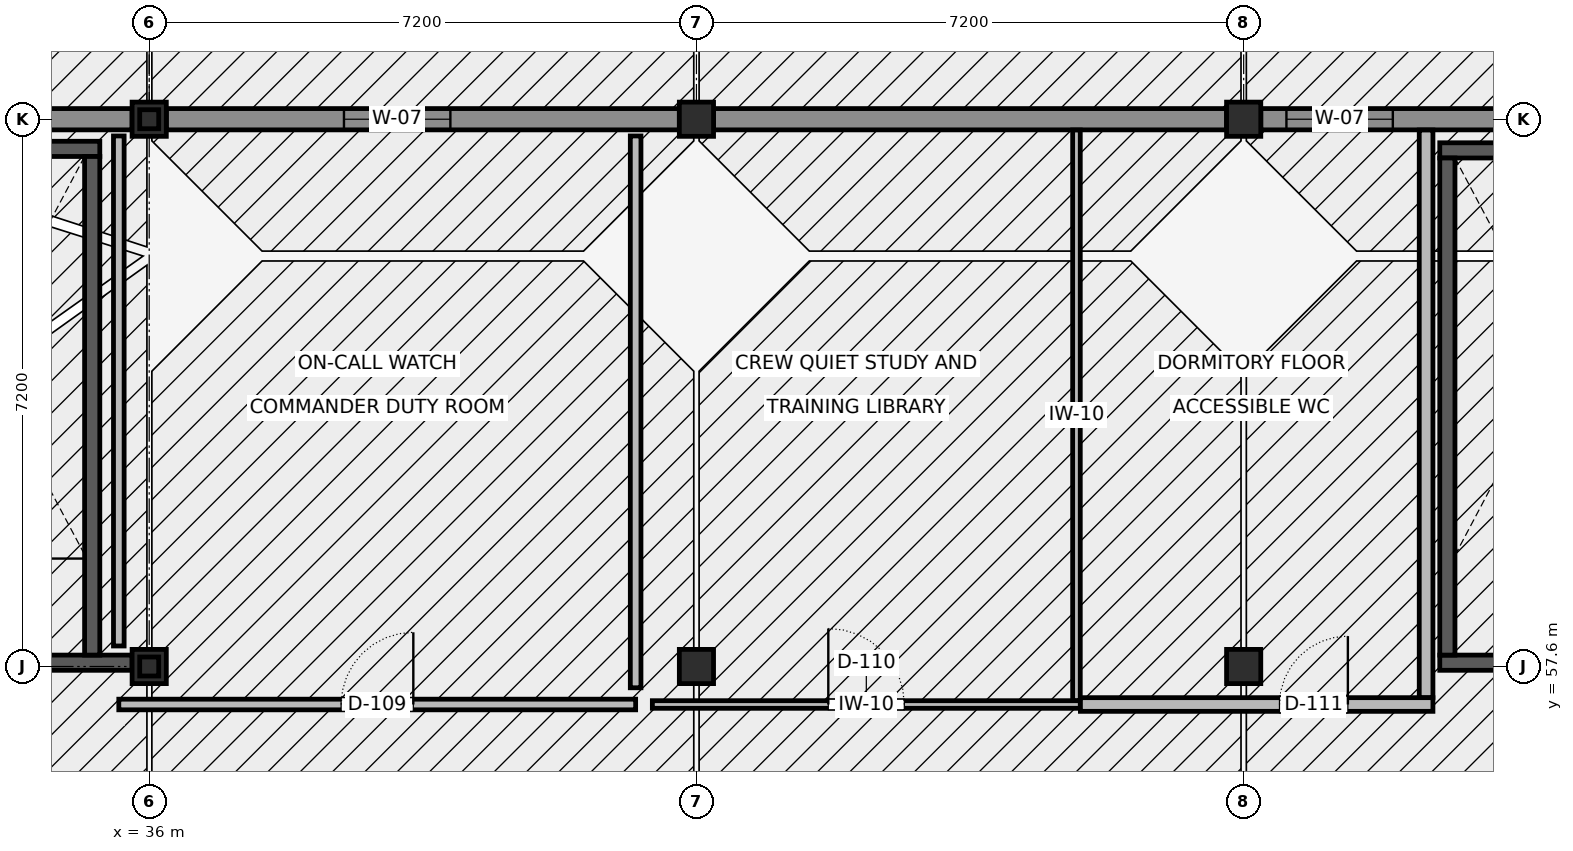
"""IFC4 building model, lengths in metres.
Left out: names, types, materials, properties, quantities, classifications, styles, units other than length and angle.
Written with IfcOpenShell. Run it as: python <this file> out.ifc"""

import sys

from ifc_helpers import new_model, si_unit, direction, frame, frame_2d, origin, origin_2d, place, context, subcontext, project, spatial, rectangle, hollow_rectangle, extrude, element, fill, save


model = new_model("IFC4")
c1 = context("Model", 3, precision=1e-05, world=origin(), true_north=direction((0.0, 1.0)))
c2 = subcontext(c1, "Body", "Model", "MODEL_VIEW")
j1 = project(units=[si_unit("LENGTHUNIT", "METRE"), si_unit("PLANEANGLEUNIT", "RADIAN")], contexts=[c1])
p1 = place(None, origin())
s1 = spatial("IfcSite", under=j1, at=p1, CompositionType="ELEMENT")
p2 = place(p1, origin())
s2 = spatial("IfcBuilding", under=s1, at=p2, CompositionType="ELEMENT")
p3 = place(p2, frame((0.0, 0.0, 9.6)))
s3 = spatial("IfcBuildingStorey", under=s2, at=p3, CompositionType="ELEMENT", Elevation=9.6)
for number, where, z_axis, x_axis in (
    (1, (36.0, 57.6, 0.0), (0.0, 0.0, 1.0), (1.0, 0.0, 0.0)),
    (2, (36.0, 64.8, 0.0), (0.0, 0.0, 1.0), (1.0, 0.0, 0.0)),
    (3, (43.2, 57.6, 0.0), (0.0, 0.0, 1.0), (1.0, 0.0, 0.0)),
    (4, (43.2, 64.8, 0.0), (0.0, 0.0, 1.0), (1.0, 0.0, 0.0)),
    (5, (50.4, 57.6, 0.0), (0.0, 0.0, 1.0), (1.0, 0.0, 0.0)),
    (6, (50.4, 64.8, 0.0), (0.0, 0.0, 1.0), (1.0, 0.0, 0.0)),
):
    element("IfcColumn", number, at=place(p3, frame(where, z_axis=z_axis, x_axis=x_axis)), inside=s3, PredefinedType="COLUMN", context=c2, shape_type="SweptSolid", body=[
        extrude(rectangle(XDim=0.45, YDim=0.45, at=origin_2d()), origin(), (0.0, 0.0, 1.0), 3.9),
    ])
p4 = place(p3, frame((32.16, 57.65, 0.0), z_axis=(0.0, 0.0, 1.0), x_axis=(1.0, 0.0, 0.0)))
e7 = element("IfcWall", 7, at=p4, inside=s3, PredefinedType="SHEAR", context=c2, shape_type="SweptSolid", body=[
    extrude(rectangle(XDim=3.615, YDim=0.2, at=frame_2d((1.808, 0.0))), origin(), (0.0, 0.0, 1.0), 3.65),
])
p5 = place(p4, frame((1.258, 0.0, 0.0)))
e8 = element("IfcOpeningElement", 8, at=p5, cuts=e7, PredefinedType="OPENING", context=c2, shape_type="SweptSolid", body=[
    extrude(rectangle(XDim=1.1, YDim=2.15, at=frame_2d((0.55, 1.075))), frame((0.0, 0.112, 0.0), z_axis=(0.0, -1.0, 0.0), x_axis=(1.0, 0.0, 0.0)), (0.0, 0.0, 1.0), 0.224),
])
p6 = place(p3, frame((32.16, 64.41, 0.0), z_axis=(0.0, 0.0, 1.0), x_axis=(1.0, 0.0, 0.0)))
e9 = element("IfcWall", 9, at=p6, inside=s3, PredefinedType="SHEAR", context=c2, shape_type="SweptSolid", body=[
    extrude(rectangle(XDim=3.19, YDim=0.2, at=frame_2d((1.595, 0.0))), origin(), (0.0, 0.0, 1.0), 3.65),
])
p7 = place(p3, frame((35.25, 57.75, 0.0), z_axis=(0.0, 0.0, 1.0), x_axis=(0.0, 1.0, 0.0)))
e10 = element("IfcWall", 10, at=p7, inside=s3, PredefinedType="SHEAR", context=c2, shape_type="SweptSolid", body=[
    extrude(rectangle(XDim=6.56, YDim=0.2, at=frame_2d((3.28, 0.0))), origin(), (0.0, 0.0, 1.0), 3.65),
])
p8 = place(p3, frame((52.98, 57.65, 0.0), z_axis=(0.0, 0.0, 1.0), x_axis=(1.0, 0.0, 0.0)))
e11 = element("IfcWall", 11, at=p8, inside=s3, PredefinedType="SHEAR", context=c2, shape_type="SweptSolid", body=[
    extrude(rectangle(XDim=3.495, YDim=0.2, at=frame_2d((1.748, 0.0))), origin(), (0.0, 0.0, 1.0), 3.65),
])
p9 = place(p8, frame((1.198, 0.0, 0.0)))
e12 = element("IfcOpeningElement", 12, at=p9, cuts=e11, PredefinedType="OPENING", context=c2, shape_type="SweptSolid", body=[
    extrude(rectangle(XDim=1.1, YDim=2.15, at=frame_2d((0.55, 1.075))), frame((0.0, 0.112, 0.0), z_axis=(0.0, -1.0, 0.0), x_axis=(1.0, 0.0, 0.0)), (0.0, 0.0, 1.0), 0.224),
])
p10 = place(p3, frame((52.98, 64.39, 0.0), z_axis=(0.0, 0.0, 1.0), x_axis=(1.0, 0.0, 0.0)))
e13 = element("IfcWall", 13, at=p10, inside=s3, PredefinedType="SHEAR", context=c2, shape_type="SweptSolid", body=[
    extrude(rectangle(XDim=3.17, YDim=0.2, at=frame_2d((1.585, 0.0))), origin(), (0.0, 0.0, 1.0), 3.65),
])
p11 = place(p3, frame((53.08, 57.75, 0.0), z_axis=(0.0, 0.0, 1.0), x_axis=(0.0, 1.0, 0.0)))
e14 = element("IfcWall", 14, at=p11, inside=s3, PredefinedType="SHEAR", context=c2, shape_type="SweptSolid", body=[
    extrude(rectangle(XDim=6.54, YDim=0.2, at=frame_2d((3.27, 0.0))), origin(), (0.0, 0.0, 1.0), 3.65),
])
for number, where, z_axis, x_axis in (
    (15, (36.0, 57.6, 3.9), (0.0, 0.0, 1.0), (1.0, 0.0, 0.0)),
    (16, (36.0, 64.8, 3.9), (0.0, 0.0, 1.0), (1.0, 0.0, 0.0)),
):
    element("IfcColumn", number, at=place(p3, frame(where, z_axis=z_axis, x_axis=x_axis)), inside=s3, PredefinedType="COLUMN", context=c2, shape_type="SweptSolid", body=[
        extrude(hollow_rectangle(XDim=0.25, YDim=0.25, WallThickness=0.012, InnerFilletRadius=0.012, OuterFilletRadius=0.024, at=origin_2d()), origin(), (0.0, 0.0, 1.0), 4.18),
    ])
p12 = place(p3, frame((56.475, 64.8, 0.0), z_axis=(0.0, 0.0, 1.0), x_axis=(-1.0, 0.0, 0.0)))
e17 = element("IfcWall", 17, at=p12, inside=s3, PredefinedType="ELEMENTEDWALL", context=c2, shape_type="SweptSolid", body=[
    extrude(rectangle(XDim=5.85, YDim=0.28, at=frame_2d((2.925, 0.0))), origin(), (0.0, 0.0, 1.0), 3.475),
])
p13 = place(p12, frame((4.113, 0.0, 0.85)))
e18 = element("IfcOpeningElement", 18, at=p13, cuts=e17, PredefinedType="OPENING", context=c2, shape_type="SweptSolid", body=[
    extrude(rectangle(XDim=1.4, YDim=1.65, at=frame_2d((0.7, 0.825))), frame((0.0, 0.152, 0.0), z_axis=(0.0, -1.0, 0.0), x_axis=(1.0, 0.0, 0.0)), (0.0, 0.0, 1.0), 0.304),
])
p14 = place(p3, frame((50.175, 64.8, 0.0), z_axis=(0.0, 0.0, 1.0), x_axis=(-1.0, 0.0, 0.0)))
e19 = element("IfcWall", 19, at=p14, inside=s3, PredefinedType="ELEMENTEDWALL", context=c2, shape_type="SweptSolid", body=[
    extrude(rectangle(XDim=6.75, YDim=0.28, at=frame_2d((3.375, 0.0))), origin(), (0.0, 0.0, 1.0), 3.475),
])
p15 = place(p3, frame((42.975, 64.8, 0.0), z_axis=(0.0, 0.0, 1.0), x_axis=(-1.0, 0.0, 0.0)))
e20 = element("IfcWall", 20, at=p15, inside=s3, PredefinedType="ELEMENTEDWALL", context=c2, shape_type="SweptSolid", body=[
    extrude(rectangle(XDim=6.75, YDim=0.28, at=frame_2d((3.375, 0.0))), origin(), (0.0, 0.0, 1.0), 3.475),
])
p16 = place(p15, frame((3.012, 0.0, 0.85)))
e21 = element("IfcOpeningElement", 21, at=p16, cuts=e20, PredefinedType="OPENING", context=c2, shape_type="SweptSolid", body=[
    extrude(rectangle(XDim=1.4, YDim=1.65, at=frame_2d((0.7, 0.825))), frame((0.0, 0.152, 0.0), z_axis=(0.0, -1.0, 0.0), x_axis=(1.0, 0.0, 0.0)), (0.0, 0.0, 1.0), 0.304),
])
p17 = place(p3, frame((35.775, 64.8, 0.0), z_axis=(0.0, 0.0, 1.0), x_axis=(-1.0, 0.0, 0.0)))
e22 = element("IfcWall", 22, at=p17, inside=s3, PredefinedType="ELEMENTEDWALL", context=c2, shape_type="SweptSolid", body=[
    extrude(rectangle(XDim=6.75, YDim=0.28, at=frame_2d((3.375, 0.0))), origin(), (0.0, 0.0, 1.0), 3.475),
])
p18 = place(p3, frame((35.6, 57.1, 0.0), z_axis=(0.0, 0.0, 1.0), x_axis=(1.0, 0.0, 0.0)))
e23 = element("IfcWall", 23, at=p18, inside=s3, PredefinedType="PARTITIONING", context=c2, shape_type="SweptSolid", body=[
    extrude(rectangle(XDim=6.8, YDim=0.14, at=frame_2d((3.4, 0.0))), origin(), (0.0, 0.0, 1.0), 3.471),
])
p19 = place(p18, frame((2.925, 0.0, 0.0)))
e24 = element("IfcOpeningElement", 24, at=p19, cuts=e23, PredefinedType="OPENING", context=c2, shape_type="SweptSolid", body=[
    extrude(rectangle(XDim=0.95, YDim=2.1, at=frame_2d((0.475, 1.05))), frame((0.0, 0.082, 0.0), z_axis=(0.0, -1.0, 0.0), x_axis=(1.0, 0.0, 0.0)), (0.0, 0.0, 1.0), 0.164),
])
p20 = place(p3, frame((42.4, 57.32, 0.0), z_axis=(0.0, 0.0, 1.0), x_axis=(0.0, 1.0, 0.0)))
e25 = element("IfcWall", 25, at=p20, inside=s3, PredefinedType="PARTITIONING", context=c2, shape_type="SweptSolid", body=[
    extrude(rectangle(XDim=7.26, YDim=0.14, at=frame_2d((3.63, 0.0))), origin(), (0.0, 0.0, 1.0), 3.473),
])
p21 = place(p3, frame((35.6, 57.87, 0.0), z_axis=(0.0, 0.0, 1.0), x_axis=(0.0, 1.0, 0.0)))
e26 = element("IfcWall", 26, at=p21, inside=s3, PredefinedType="PARTITIONING", context=c2, shape_type="SweptSolid", body=[
    extrude(rectangle(XDim=6.71, YDim=0.14, at=frame_2d((3.355, 0.0))), origin(), (0.0, 0.0, 1.0), 3.62),
])
p22 = place(p3, frame((42.62, 57.1, 0.0), z_axis=(0.0, 0.0, 1.0), x_axis=(1.0, 0.0, 0.0)))
e27 = element("IfcWall", 27, at=p22, inside=s3, PredefinedType="PARTITIONING", context=c2, shape_type="SweptSolid", body=[
    extrude(rectangle(XDim=5.63, YDim=0.1, at=frame_2d((2.815, 0.0))), origin(), (0.0, 0.0, 1.0), 3.471),
])
p23 = place(p22, frame((2.315, 0.0, 0.0)))
e28 = element("IfcOpeningElement", 28, at=p23, cuts=e27, PredefinedType="OPENING", context=c2, shape_type="SweptSolid", body=[
    extrude(rectangle(XDim=1.0, YDim=2.15, at=frame_2d((0.5, 1.075))), frame((0.0, 0.062, 0.0), z_axis=(0.0, -1.0, 0.0), x_axis=(1.0, 0.0, 0.0)), (0.0, 0.0, 1.0), 0.124),
])
p24 = place(p3, frame((48.2, 57.152, 0.0), z_axis=(0.0, 0.0, 1.0), x_axis=(0.0, 1.0, 0.0)))
e29 = element("IfcWall", 29, at=p24, inside=s3, PredefinedType="PARTITIONING", context=c2, shape_type="SweptSolid", body=[
    extrude(rectangle(XDim=7.506, YDim=0.1, at=frame_2d((3.753, 0.0))), origin(), (0.0, 0.0, 1.0), 3.473),
])
p25 = place(p3, frame((48.252, 57.1, 0.0), z_axis=(0.0, 0.0, 1.0), x_axis=(1.0, 0.0, 0.0)))
e30 = element("IfcWall", 30, at=p25, inside=s3, PredefinedType="PLUMBINGWALL", context=c2, shape_type="SweptSolid", body=[
    extrude(rectangle(XDim=4.638, YDim=0.18, at=frame_2d((2.319, 0.0))), origin(), (0.0, 0.0, 1.0), 3.471),
])
p26 = place(p25, frame((2.619, 0.0, 0.0)))
e31 = element("IfcOpeningElement", 31, at=p26, cuts=e30, PredefinedType="OPENING", context=c2, shape_type="SweptSolid", body=[
    extrude(rectangle(XDim=0.9, YDim=2.1, at=frame_2d((0.45, 1.05))), frame((0.0, 0.102, 0.0), z_axis=(0.0, -1.0, 0.0), x_axis=(1.0, 0.0, 0.0)), (0.0, 0.0, 1.0), 0.204),
])
p27 = place(p3, frame((52.8, 57.192, 0.0), z_axis=(0.0, 0.0, 1.0), x_axis=(0.0, 1.0, 0.0)))
e32 = element("IfcWall", 32, at=p27, inside=s3, PredefinedType="PLUMBINGWALL", context=c2, shape_type="SweptSolid", body=[
    extrude(rectangle(XDim=7.466, YDim=0.18, at=frame_2d((3.733, 0.0))), origin(), (0.0, 0.0, 1.0), 3.473),
])
p28 = place(p13, origin())
e33 = element("IfcWindow", 33, at=p28, inside=s3, PartitioningType="SINGLE_PANEL", PredefinedType="WINDOW", context=c2, shape_type="SweptSolid", body=[
    extrude(rectangle(XDim=1.4, YDim=1.65, at=frame_2d((0.7, 0.825))), frame((0.0, 0.03, 0.0), z_axis=(0.0, -1.0, 0.0), x_axis=(1.0, 0.0, 0.0)), (0.0, 0.0, 1.0), 0.06),
])
fill(e18, e33)
p29 = place(p16, origin())
e34 = element("IfcWindow", 34, at=p29, inside=s3, PartitioningType="SINGLE_PANEL", PredefinedType="WINDOW", context=c2, shape_type="SweptSolid", body=[
    extrude(rectangle(XDim=1.4, YDim=1.65, at=frame_2d((0.7, 0.825))), frame((0.0, 0.03, 0.0), z_axis=(0.0, -1.0, 0.0), x_axis=(1.0, 0.0, 0.0)), (0.0, 0.0, 1.0), 0.06),
])
fill(e21, e34)
p30 = place(p19, origin())
e35 = element("IfcDoor", 35, at=p30, inside=s3, OperationType="SINGLE_SWING_RIGHT", PredefinedType="DOOR", context=c2, shape_type="SweptSolid", body=[
    extrude(rectangle(XDim=0.95, YDim=2.1, at=frame_2d((0.475, 1.05))), frame((0.0, 0.025, 0.0), z_axis=(0.0, -1.0, 0.0), x_axis=(1.0, 0.0, 0.0)), (0.0, 0.0, 1.0), 0.05),
])
fill(e24, e35)
p31 = place(p23, origin())
e36 = element("IfcDoor", 36, at=p31, inside=s3, OperationType="SINGLE_SWING_LEFT", PredefinedType="DOOR", context=c2, shape_type="SweptSolid", body=[
    extrude(rectangle(XDim=1.0, YDim=2.15, at=frame_2d((0.5, 1.075))), frame((0.0, 0.025, 0.0), z_axis=(0.0, -1.0, 0.0), x_axis=(1.0, 0.0, 0.0)), (0.0, 0.0, 1.0), 0.05),
])
fill(e28, e36)
p32 = place(p26, origin())
e37 = element("IfcDoor", 37, at=p32, inside=s3, OperationType="SINGLE_SWING_RIGHT", PredefinedType="DOOR", context=c2, shape_type="SweptSolid", body=[
    extrude(rectangle(XDim=0.9, YDim=2.1, at=frame_2d((0.45, 1.05))), frame((0.0, 0.025, 0.0), z_axis=(0.0, -1.0, 0.0), x_axis=(1.0, 0.0, 0.0)), (0.0, 0.0, 1.0), 0.05),
])
fill(e31, e37)
save(model, sys.argv[1])
